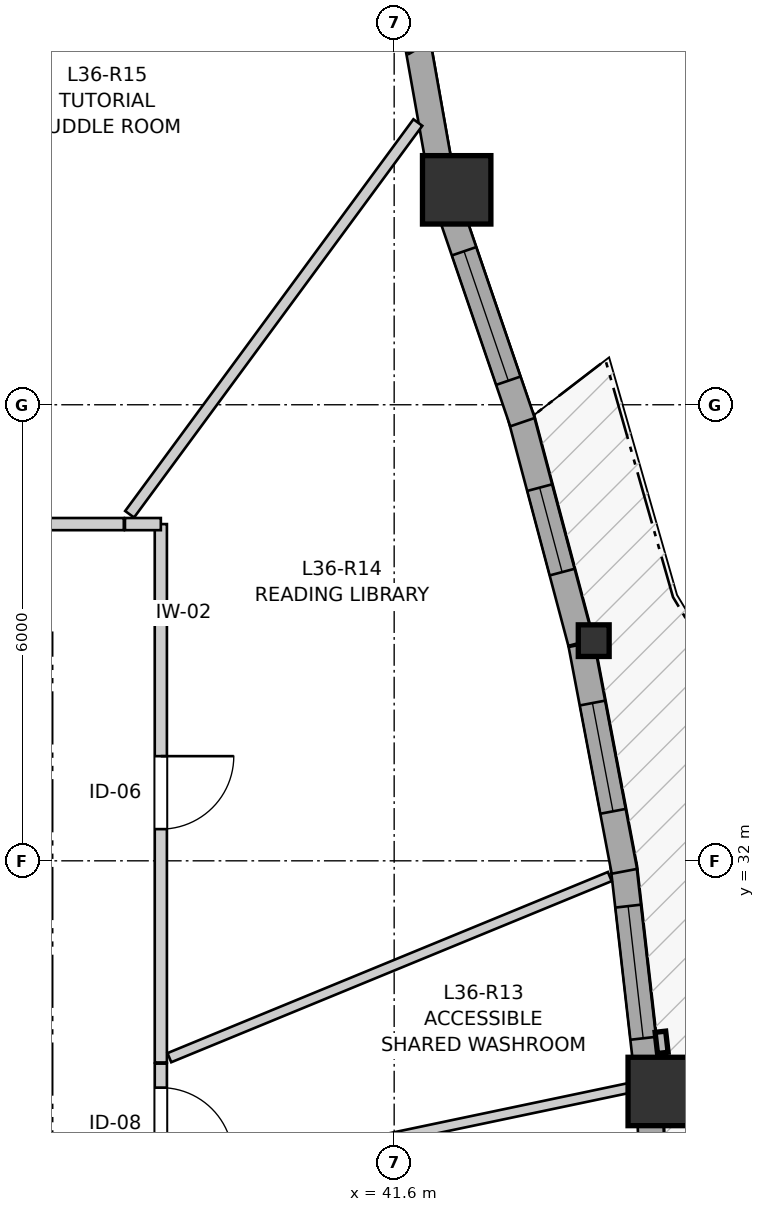
"""IFC4 building model, lengths in metres.
Left out: names, types, materials, properties, quantities, classifications, styles, units other than length and angle.
Written with IfcOpenShell. Run it as: python <this file> out.ifc"""

import sys

from ifc_helpers import new_model, si_unit, direction, frame, frame_2d, origin, origin_2d, place, context, subcontext, project, spatial, rectangle, i_section, extrude, source, transform, mapped, element, fill, save


model = new_model("IFC4")
c1 = context("Model", 3, precision=1e-05, world=origin(), true_north=direction((0.0, 1.0)))
c2 = subcontext(c1, "Body", "Model", "MODEL_VIEW")
j1 = project(units=[si_unit("LENGTHUNIT", "METRE"), si_unit("PLANEANGLEUNIT", "RADIAN")], contexts=[c1])
p1 = place(None, origin())
s1 = spatial("IfcSite", under=j1, at=p1, CompositionType="ELEMENT")
p2 = place(p1, origin())
s2 = spatial("IfcBuilding", under=s1, at=p2, CompositionType="ELEMENT")
p3 = place(p2, frame((0.0, 0.0, 121.6)))
s3 = spatial("IfcBuildingStorey", under=s2, at=p3, CompositionType="ELEMENT", Elevation=121.6)
m1 = source(origin(), c2, "Body", "SweptSolid", [
    extrude(rectangle(XDim=0.9, YDim=0.9, at=origin_2d()), origin(), (0.0, 0.0, 1.0), 2.95),
])
p4 = place(p3, frame((45.127, 28.966, 0.0), z_axis=(0.0, 0.0, 1.0), x_axis=(1.0, 0.0, 0.0)))
e1 = element("IfcColumn", 1, at=p4, inside=s3, PredefinedType="COLUMN", context=c2, shape_type="MappedRepresentation", body=[
    mapped(m1, transform((0.0, 0.0, 0.0), x_axis=(1.0, 0.0, 0.0), y_axis=(0.0, 1.0, 0.0), z_axis=(0.0, 0.0, 1.0), scale=1.0)),
])
m2 = source(origin(), c2, "Body", "SweptSolid", [
    extrude(i_section(OverallWidth=0.406, OverallDepth=0.416, WebThickness=0.027, FlangeThickness=0.044, FilletRadius=0.015, at=origin_2d()), origin(), (0.0, 0.0, 1.0), 2.95),
])
p5 = place(p3, frame((44.226, 34.896, 0.0), z_axis=(0.0, 0.0, 1.0), x_axis=(1.0, 0.0, 0.0)))
e2 = element("IfcColumn", 2, at=p5, inside=s3, PredefinedType="PILASTER", context=c2, shape_type="MappedRepresentation", body=[
    mapped(m2, transform((0.0, 0.0, 0.0), x_axis=(1.0, 0.0, 0.0), y_axis=(0.0, 1.0, 0.0), z_axis=(0.0, 0.0, 1.0), scale=1.0)),
])
p6 = place(p3, frame((42.423, 40.828, 0.0), z_axis=(0.0, 0.0, 1.0), x_axis=(1.0, 0.0, 0.0)))
e3 = element("IfcColumn", 3, at=p6, inside=s3, PredefinedType="COLUMN", context=c2, shape_type="MappedRepresentation", body=[
    mapped(m1, transform((0.0, 0.0, 0.0), x_axis=(1.0, 0.0, 0.0), y_axis=(0.0, 1.0, 0.0), z_axis=(0.0, 0.0, 1.0), scale=1.0)),
])
p7 = place(p3, frame((45.071, 25.956, 0.0), z_axis=(0.0, 0.0, 1.0), x_axis=(-0.037997361734, 0.999277839493, 0.0)))
e4 = element("IfcWall", 4, at=p7, inside=s3, PredefinedType="SOLIDWALL", context=c2, shape_type="SweptSolid", body=[
    extrude(rectangle(XDim=2.776, YDim=0.34, at=frame_2d((1.388, 0.0))), origin(), (0.0, 0.0, 1.0), 2.48),
])
p8 = place(p7, frame((0.771, 0.0, 0.82)))
e5 = element("IfcOpeningElement", 5, at=p8, cuts=e4, PredefinedType="OPENING", context=c2, shape_type="SweptSolid", body=[
    extrude(rectangle(XDim=1.45, YDim=1.25, at=frame_2d((0.725, 0.625))), frame((0.0, 0.18, 0.0), z_axis=(0.0, -1.0, 0.0), x_axis=(1.0, 0.0, 0.0)), (0.0, 0.0, 1.0), 0.36),
])
p9 = place(p3, frame((44.932, 29.175, 0.0), z_axis=(0.0, 0.0, 1.0), x_axis=(-0.113290188042, 0.993561942354, 0.0)))
e6 = element("IfcWall", 6, at=p9, inside=s3, PredefinedType="SOLIDWALL", context=c2, shape_type="SweptSolid", body=[
    extrude(rectangle(XDim=2.793, YDim=0.34, at=frame_2d((1.396, 0.0))), origin(), (0.0, 0.0, 1.0), 2.48),
])
p10 = place(p9, frame((0.493, 0.0, 0.82)))
e7 = element("IfcOpeningElement", 7, at=p10, cuts=e6, PredefinedType="OPENING", context=c2, shape_type="SweptSolid", body=[
    extrude(rectangle(XDim=1.75, YDim=1.3, at=frame_2d((0.875, 0.65))), frame((0.0, 0.18, 0.0), z_axis=(0.0, -1.0, 0.0), x_axis=(1.0, 0.0, 0.0)), (0.0, 0.0, 1.0), 0.36),
])
p11 = place(p3, frame((44.629, 31.862, 0.0), z_axis=(0.0, 0.0, 1.0), x_axis=(-0.186690909565, 0.982418701108, 0.0)))
e8 = element("IfcWall", 8, at=p11, inside=s3, PredefinedType="SOLIDWALL", context=c2, shape_type="SweptSolid", body=[
    extrude(rectangle(XDim=3.037, YDim=0.34, at=frame_2d((1.518, 0.0))), origin(), (0.0, 0.0, 1.0), 2.48),
])
p12 = place(p11, frame((0.803, 0.0, 0.82)))
e9 = element("IfcOpeningElement", 9, at=p12, cuts=e8, PredefinedType="OPENING", context=c2, shape_type="SweptSolid", body=[
    extrude(rectangle(XDim=1.45, YDim=1.25, at=frame_2d((0.725, 0.625))), frame((0.0, 0.18, 0.0), z_axis=(0.0, -1.0, 0.0), x_axis=(1.0, 0.0, 0.0)), (0.0, 0.0, 1.0), 0.36),
])
p13 = place(p3, frame((44.056, 34.872, 0.0), z_axis=(0.0, 0.0, 1.0), x_axis=(-0.257081647056, 0.966389686797, 0.0)))
e10 = element("IfcWall", 10, at=p13, inside=s3, PredefinedType="SOLIDWALL", context=c2, shape_type="SweptSolid", body=[
    extrude(rectangle(XDim=3.086, YDim=0.34, at=frame_2d((1.543, 0.0))), origin(), (0.0, 0.0, 1.0), 2.48),
])
p14 = place(p13, frame((0.958, 0.0, 0.82)))
e11 = element("IfcOpeningElement", 11, at=p14, cuts=e10, PredefinedType="OPENING", context=c2, shape_type="SweptSolid", body=[
    extrude(rectangle(XDim=1.15, YDim=1.2, at=frame_2d((0.575, 0.6))), frame((0.0, 0.18, 0.0), z_axis=(0.0, -1.0, 0.0), x_axis=(1.0, 0.0, 0.0)), (0.0, 0.0, 1.0), 0.36),
])
p15 = place(p3, frame((43.288, 37.771, 0.0), z_axis=(0.0, 0.0, 1.0), x_axis=(-0.323537149191, 0.94621546864, 0.0)))
e12 = element("IfcWall", 12, at=p15, inside=s3, PredefinedType="SOLIDWALL", context=c2, shape_type="SweptSolid", body=[
    extrude(rectangle(XDim=2.942, YDim=0.34, at=frame_2d((1.471, 0.0))), origin(), (0.0, 0.0, 1.0), 2.48),
])
p16 = place(p15, frame((0.576, 0.0, 0.82)))
e13 = element("IfcOpeningElement", 13, at=p16, cuts=e12, PredefinedType="OPENING", context=c2, shape_type="SweptSolid", body=[
    extrude(rectangle(XDim=1.8, YDim=1.45, at=frame_2d((0.9, 0.725))), frame((0.0, 0.18, 0.0), z_axis=(0.0, -1.0, 0.0), x_axis=(1.0, 0.0, 0.0)), (0.0, 0.0, 1.0), 0.36),
])
p17 = place(p3, frame((42.215, 41.024, 0.0), z_axis=(0.0, 0.0, 1.0), x_axis=(-0.17440141227, 0.984674640375, 0.0)))
e14 = element("IfcWall", 14, at=p17, inside=s3, PredefinedType="SOLIDWALL", context=c2, shape_type="SweptSolid", body=[
    extrude(rectangle(XDim=1.831, YDim=0.34, at=frame_2d((0.916, 0.0))), origin(), (0.0, 0.0, 1.0), 2.48),
])
p18 = place(p3, frame((41.942, 42.701, 0.0), z_axis=(0.0, 0.0, 1.0), x_axis=(-0.501902596059, 0.864924149315, 0.0)))
e15 = element("IfcWall", 15, at=p18, inside=s3, PredefinedType="SOLIDWALL", context=c2, shape_type="SweptSolid", body=[
    extrude(rectangle(XDim=2.099, YDim=0.34, at=frame_2d((1.049, 0.0))), origin(), (0.0, 0.0, 1.0), 2.48),
])
p19 = place(p18, frame((0.3, 0.0, 0.82)))
e16 = element("IfcOpeningElement", 16, at=p19, cuts=e15, PredefinedType="OPENING", context=c2, shape_type="SweptSolid", body=[
    extrude(rectangle(XDim=1.5, YDim=1.45, at=frame_2d((0.75, 0.725))), frame((0.0, 0.18, 0.0), z_axis=(0.0, -1.0, 0.0), x_axis=(1.0, 0.0, 0.0)), (0.0, 0.0, 1.0), 0.36),
])
p20 = place(p3, frame((38.53, 36.43, 0.0), z_axis=(0.0, 0.0, 1.0), x_axis=(0.0, -1.0, 0.0)))
e17 = element("IfcWall", 17, at=p20, inside=s3, PredefinedType="PARTITIONING", context=c2, shape_type="SweptSolid", body=[
    extrude(rectangle(XDim=7.083, YDim=0.16, at=frame_2d((3.542, 0.0))), origin(), (0.0, 0.0, 1.0), 2.588),
])
p21 = place(p20, frame((3.053, 0.0, 0.0)))
e18 = element("IfcOpeningElement", 18, at=p21, cuts=e17, PredefinedType="OPENING", context=c2, shape_type="SweptSolid", body=[
    extrude(rectangle(XDim=0.96, YDim=2.1, at=frame_2d((0.48, 1.05))), frame((0.0, 0.09, 0.0), z_axis=(0.0, -1.0, 0.0), x_axis=(1.0, 0.0, 0.0)), (0.0, 0.0, 1.0), 0.18),
])
p22 = place(p3, frame((32.925, 36.43, 0.0), z_axis=(0.0, 0.0, 1.0), x_axis=(1.0, 0.0, 0.0)))
e19 = element("IfcWall", 19, at=p22, inside=s3, PredefinedType="PARTITIONING", context=c2, shape_type="SweptSolid", body=[
    extrude(rectangle(XDim=5.118, YDim=0.16, at=frame_2d((2.559, 0.0))), origin(), (0.0, 0.0, 1.0), 2.588),
])
p23 = place(p22, frame((1.907, 0.0, 0.0)))
e20 = element("IfcOpeningElement", 20, at=p23, cuts=e19, PredefinedType="OPENING", context=c2, shape_type="SweptSolid", body=[
    extrude(rectangle(XDim=1.3, YDim=2.1, at=frame_2d((0.65, 1.05))), frame((0.0, 0.09, 0.0), z_axis=(0.0, -1.0, 0.0), x_axis=(1.0, 0.0, 0.0)), (0.0, 0.0, 1.0), 0.18),
])
p24 = place(p3, frame((38.53, 29.332, 0.0), z_axis=(0.0, 0.0, 1.0), x_axis=(0.0, -1.0, 0.0)))
e21 = element("IfcWall", 21, at=p24, inside=s3, PredefinedType="PARTITIONING", context=c2, shape_type="SweptSolid", body=[
    extrude(rectangle(XDim=1.629, YDim=0.16, at=frame_2d((0.814, 0.0))), origin(), (0.0, 0.0, 1.0), 2.95),
])
p25 = place(p24, frame((0.316, 0.0, 0.0)))
e22 = element("IfcOpeningElement", 22, at=p25, cuts=e21, PredefinedType="OPENING", context=c2, shape_type="SweptSolid", body=[
    extrude(rectangle(XDim=0.95, YDim=2.1, at=frame_2d((0.475, 1.05))), frame((0.0, 0.09, 0.0), z_axis=(0.0, -1.0, 0.0), x_axis=(1.0, 0.0, 0.0)), (0.0, 0.0, 1.0), 0.18),
])
p26 = place(p3, frame((38.119, 36.559, 0.0), z_axis=(0.0, 0.0, 1.0), x_axis=(0.592704345809, 0.805420113021, 0.0)))
e23 = element("IfcWall", 23, at=p26, inside=s3, PredefinedType="PARTITIONING", context=c2, shape_type="SweptSolid", body=[
    extrude(rectangle(XDim=6.399, YDim=0.145, at=frame_2d((3.199, 0.0))), origin(), (0.0, 0.0, 1.0), 2.95),
])
p27 = place(p3, frame((38.642, 29.41, 0.0), z_axis=(0.0, 0.0, 1.0), x_axis=(0.924865201518, 0.380295094659, 0.0)))
e24 = element("IfcWall", 24, at=p27, inside=s3, PredefinedType="PARTITIONING", context=c2, shape_type="SweptSolid", body=[
    extrude(rectangle(XDim=6.266, YDim=0.13, at=frame_2d((3.133, 0.0))), origin(), (0.0, 0.0, 1.0), 2.95),
])
p28 = place(p3, frame((38.631, 27.739, 0.0), z_axis=(0.0, 0.0, 1.0), x_axis=(0.978654667538, 0.205511658323, 0.0)))
e25 = element("IfcWall", 25, at=p28, inside=s3, PredefinedType="PARTITIONING", context=c2, shape_type="SweptSolid", body=[
    extrude(rectangle(XDim=6.29, YDim=0.13, at=frame_2d((3.145, 0.0))), origin(), (0.0, 0.0, 1.0), 2.368),
])
p29 = place(p3, frame((38.058, 36.43, 0.0), z_axis=(0.0, 0.0, 1.0), x_axis=(1.0, 0.0, 0.0)))
e26 = element("IfcWall", 26, at=p29, inside=s3, PredefinedType="PARTITIONING", context=c2, shape_type="SweptSolid", body=[
    extrude(rectangle(XDim=0.472, YDim=0.16, at=frame_2d((0.236, 0.0))), origin(), (0.0, 0.0, 1.0), 2.588),
])
m3 = source(origin(), c2, "Body", "SweptSolid", [
    extrude(rectangle(XDim=1.75, YDim=1.3, at=frame_2d((0.875, 0.65))), frame((0.0, 0.03, 0.0), z_axis=(0.0, -1.0, 0.0), x_axis=(1.0, 0.0, 0.0)), (0.0, 0.0, 1.0), 0.06),
])
p30 = place(p10, origin())
e27 = element("IfcWindow", 27, at=p30, inside=s3, PartitioningType="SINGLE_PANEL", PredefinedType="WINDOW", context=c2, shape_type="MappedRepresentation", body=[
    mapped(m3, transform((0.0, 0.0, 0.0), x_axis=(1.0, 0.0, 0.0), y_axis=(0.0, 1.0, 0.0), z_axis=(0.0, 0.0, 1.0), scale=1.0)),
])
fill(e7, e27)
m4 = source(origin(), c2, "Body", "SweptSolid", [
    extrude(rectangle(XDim=1.45, YDim=1.25, at=frame_2d((0.725, 0.625))), frame((0.0, 0.03, 0.0), z_axis=(0.0, -1.0, 0.0), x_axis=(1.0, 0.0, 0.0)), (0.0, 0.0, 1.0), 0.06),
])
p31 = place(p12, origin())
e28 = element("IfcWindow", 28, at=p31, inside=s3, PartitioningType="SINGLE_PANEL", PredefinedType="WINDOW", context=c2, shape_type="MappedRepresentation", body=[
    mapped(m4, transform((0.0, 0.0, 0.0), x_axis=(1.0, 0.0, 0.0), y_axis=(0.0, 1.0, 0.0), z_axis=(0.0, 0.0, 1.0), scale=1.0)),
])
fill(e9, e28)
m5 = source(origin(), c2, "Body", "SweptSolid", [
    extrude(rectangle(XDim=1.15, YDim=1.2, at=frame_2d((0.575, 0.6))), frame((0.0, 0.03, 0.0), z_axis=(0.0, -1.0, 0.0), x_axis=(1.0, 0.0, 0.0)), (0.0, 0.0, 1.0), 0.06),
])
p32 = place(p14, origin())
e29 = element("IfcWindow", 29, at=p32, inside=s3, PartitioningType="SINGLE_PANEL", PredefinedType="WINDOW", context=c2, shape_type="MappedRepresentation", body=[
    mapped(m5, transform((0.0, 0.0, 0.0), x_axis=(1.0, 0.0, 0.0), y_axis=(0.0, 1.0, 0.0), z_axis=(0.0, 0.0, 1.0), scale=1.0)),
])
fill(e11, e29)
m6 = source(origin(), c2, "Body", "SweptSolid", [
    extrude(rectangle(XDim=1.8, YDim=1.45, at=frame_2d((0.9, 0.725))), frame((0.0, 0.03, 0.0), z_axis=(0.0, -1.0, 0.0), x_axis=(1.0, 0.0, 0.0)), (0.0, 0.0, 1.0), 0.06),
])
p33 = place(p16, origin())
e30 = element("IfcWindow", 30, at=p33, inside=s3, PartitioningType="SINGLE_PANEL", PredefinedType="WINDOW", context=c2, shape_type="MappedRepresentation", body=[
    mapped(m6, transform((0.0, 0.0, 0.0), x_axis=(1.0, 0.0, 0.0), y_axis=(0.0, 1.0, 0.0), z_axis=(0.0, 0.0, 1.0), scale=1.0)),
])
fill(e13, e30)
m7 = source(origin(), c2, "Body", "SweptSolid", [
    extrude(rectangle(XDim=0.96, YDim=2.1, at=frame_2d((0.48, 1.05))), frame((0.0, 0.025, 0.0), z_axis=(0.0, -1.0, 0.0), x_axis=(1.0, 0.0, 0.0)), (0.0, 0.0, 1.0), 0.05),
])
p34 = place(p21, origin())
e31 = element("IfcDoor", 31, at=p34, inside=s3, OperationType="SINGLE_SWING_LEFT", PredefinedType="DOOR", context=c2, shape_type="MappedRepresentation", body=[
    mapped(m7, transform((0.0, 0.0, 0.0), x_axis=(1.0, 0.0, 0.0), y_axis=(0.0, 1.0, 0.0), z_axis=(0.0, 0.0, 1.0), scale=1.0)),
])
fill(e18, e31)
m8 = source(origin(), c2, "Body", "SweptSolid", [
    extrude(rectangle(XDim=0.95, YDim=2.1, at=frame_2d((0.475, 1.05))), frame((0.0, 0.025, 0.0), z_axis=(0.0, -1.0, 0.0), x_axis=(1.0, 0.0, 0.0)), (0.0, 0.0, 1.0), 0.05),
])
p35 = place(p25, origin())
e32 = element("IfcDoor", 32, at=p35, inside=s3, OperationType="SINGLE_SWING_RIGHT", PredefinedType="DOOR", context=c2, shape_type="MappedRepresentation", body=[
    mapped(m8, transform((0.0, 0.0, 0.0), x_axis=(1.0, 0.0, 0.0), y_axis=(0.0, 1.0, 0.0), z_axis=(0.0, 0.0, 1.0), scale=1.0)),
])
fill(e22, e32)
save(model, sys.argv[1])
